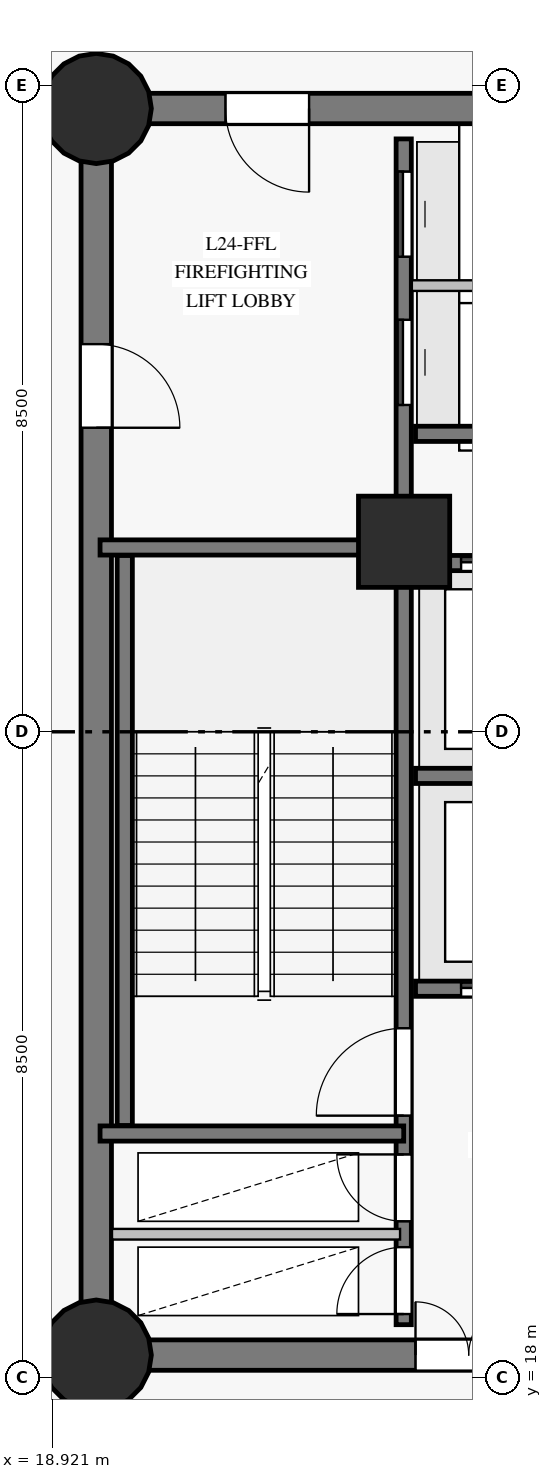
"""IFC4 building model, lengths in metres.
Left out: names, types, materials, properties, quantities, classifications, styles, units other than length and angle.
Written with IfcOpenShell. Run it as: python <this file> out.ifc"""

import sys

from ifc_helpers import new_model, si_unit, direction, frame, frame_2d, origin, origin_with_axes, origin_2d, place, context, subcontext, project, spatial, rectangle, circle, extrude, source, transform, mapped, element, fill, save


model = new_model("IFC4")
c1 = context("Model", 3, precision=1e-05, world=origin(), true_north=direction((0.0, 1.0)))
c2 = subcontext(c1, "Body", "Model", "MODEL_VIEW")
j1 = project(units=[si_unit("LENGTHUNIT", "METRE"), si_unit("PLANEANGLEUNIT", "RADIAN")], contexts=[c1])
p1 = place(None, origin())
s1 = spatial("IfcSite", under=j1, at=p1, CompositionType="ELEMENT")
p2 = place(p1, origin())
s2 = spatial("IfcBuilding", under=s1, at=p2, CompositionType="ELEMENT")
p3 = place(p2, frame((0.0, 0.0, 92.2)))
s3 = spatial("IfcBuildingStorey", under=s2, at=p3, CompositionType="ELEMENT", Elevation=92.2)
p4 = place(p3, frame((19.5, 18.3, 0.0), z_axis=(0.0, 0.0, 1.0), x_axis=(1.0, 0.0, 0.0)))
e1 = element("IfcWall", 1, at=p4, inside=s3, PredefinedType="SHEAR", context=c2, shape_type="SweptSolid", body=[
    extrude(rectangle(XDim=7.05, YDim=0.4, at=frame_2d((3.525, 0.0))), origin(), (0.0, 0.0, 1.0), 3.775),
])
p5 = place(p4, frame((4.2, 0.0, 0.0)))
e2 = element("IfcOpeningElement", 2, at=p5, cuts=e1, PredefinedType="OPENING", context=c2, shape_type="SweptSolid", body=[
    extrude(rectangle(XDim=1.4, YDim=2.2, at=frame_2d((0.7, 1.1))), frame((0.0, 0.21, 0.0), z_axis=(0.0, -1.0, 0.0), x_axis=(1.0, 0.0, 0.0)), (0.0, 0.0, 1.0), 0.42),
])
p6 = place(p3, frame((26.55, 34.7, 0.0), z_axis=(0.0, 0.0, 1.0), x_axis=(-1.0, 0.0, 0.0)))
e3 = element("IfcWall", 3, at=p6, inside=s3, PredefinedType="SHEAR", context=c2, shape_type="SweptSolid", body=[
    extrude(rectangle(XDim=7.05, YDim=0.4, at=frame_2d((3.525, 0.0))), origin(), (0.0, 0.0, 1.0), 3.775),
])
p7 = place(p6, frame((4.25, 0.0, 0.0)))
e4 = element("IfcOpeningElement", 4, at=p7, cuts=e3, PredefinedType="OPENING", context=c2, shape_type="SweptSolid", body=[
    extrude(rectangle(XDim=1.1, YDim=2.15, at=frame_2d((0.55, 1.075))), frame((0.0, 0.21, 0.0), z_axis=(0.0, -1.0, 0.0), x_axis=(1.0, 0.0, 0.0)), (0.0, 0.0, 1.0), 0.42),
])
p8 = place(p3, frame((19.5, 34.7, 0.0), z_axis=(0.0, 0.0, 1.0), x_axis=(0.0, -1.0, 0.0)))
e5 = element("IfcWall", 5, at=p8, inside=s3, PredefinedType="SHEAR", context=c2, shape_type="SweptSolid", body=[
    extrude(rectangle(XDim=16.4, YDim=0.4, at=frame_2d((8.2, 0.0))), origin(), (0.0, 0.0, 1.0), 3.775),
])
p9 = place(p8, frame((3.1, 0.0, 0.0)))
e6 = element("IfcOpeningElement", 6, at=p9, cuts=e5, PredefinedType="OPENING", context=c2, shape_type="SweptSolid", body=[
    extrude(rectangle(XDim=1.1, YDim=2.15, at=frame_2d((0.55, 1.075))), frame((0.0, 0.21, 0.0), z_axis=(0.0, -1.0, 0.0), x_axis=(1.0, 0.0, 0.0)), (0.0, 0.0, 1.0), 0.42),
])
m1 = source(origin_with_axes(), c2, "Body", "SweptSolid", [
    extrude(circle(Radius=0.725, at=origin_2d()), origin(), (0.0, 0.0, 1.0), 4.0),
])
for number, where, z_axis, x_axis in (
    (7, (19.5, 18.3, 0.0), (0.0, 0.0, 1.0), (1.0, 0.0, 0.0)),
    (8, (19.5, 34.7, 0.0), (0.0, 0.0, 1.0), (1.0, 0.0, 0.0)),
):
    element("IfcColumn", number, at=place(p3, frame(where, z_axis=z_axis, x_axis=x_axis)), inside=s3, PredefinedType="COLUMN", context=c2, shape_type="MappedRepresentation", body=[
        mapped(m1, transform((0.0, 0.0, 0.0), scale=1.0)),
    ])
m2 = source(origin_with_axes(), c2, "Body", "SweptSolid", [
    extrude(rectangle(XDim=1.2, YDim=1.2, at=origin_2d()), origin(), (0.0, 0.0, 1.0), 4.0),
])
p10 = place(p3, frame((23.55, 29.0, 0.0), z_axis=(0.0, 0.0, 1.0), x_axis=(1.0, 0.0, 0.0)))
e9 = element("IfcColumn", 9, at=p10, inside=s3, PredefinedType="COLUMN", context=c2, shape_type="MappedRepresentation", body=[
    mapped(m2, transform((0.0, 0.0, 0.0), scale=1.0)),
])
p11 = place(p3, frame((22.111, 46.894, 0.0), z_axis=(0.0, 0.0, 1.0), x_axis=(-0.621146049856, -0.783694828839, 0.0)))
e10 = element("IfcWall", 10, at=p11, inside=s3, PredefinedType="SOLIDWALL", context=c2, shape_type="SweptSolid", body=[
    extrude(rectangle(XDim=24.028, YDim=0.32, at=frame_2d((12.014, 0.0))), origin(), (0.0, 0.0, 1.0), 3.445),
])
p12 = place(p11, frame((5.801, 0.0, 0.85)))
e11 = element("IfcOpeningElement", 11, at=p12, cuts=e10, PredefinedType="OPENING", context=c2, shape_type="SweptSolid", body=[
    extrude(rectangle(XDim=1.65, YDim=1.65, at=frame_2d((0.825, 0.825))), frame((0.0, 0.17, 0.0), z_axis=(0.0, -1.0, 0.0), x_axis=(1.0, 0.0, 0.0)), (0.0, 0.0, 1.0), 0.34),
])
p13 = place(p11, frame((15.706, 0.0, 0.85)))
e12 = element("IfcOpeningElement", 12, at=p13, cuts=e10, PredefinedType="OPENING", context=c2, shape_type="SweptSolid", body=[
    extrude(rectangle(XDim=1.65, YDim=1.65, at=frame_2d((0.825, 0.825))), frame((0.0, 0.17, 0.0), z_axis=(0.0, -1.0, 0.0), x_axis=(1.0, 0.0, 0.0)), (0.0, 0.0, 1.0), 0.34),
])
p14 = place(p11, frame((20.5, 0.0, 0.0)))
e13 = element("IfcOpeningElement", 13, at=p14, cuts=e10, PredefinedType="OPENING", context=c2, shape_type="SweptSolid", body=[
    extrude(rectangle(XDim=1.05, YDim=2.12, at=frame_2d((0.525, 1.06))), frame((0.0, 0.17, 0.0), z_axis=(0.0, -1.0, 0.0), x_axis=(1.0, 0.0, 0.0)), (0.0, 0.0, 1.0), 0.34),
])
p15 = place(p3, frame((23.545, 18.7, 0.0), z_axis=(0.0, 0.0, 1.0), x_axis=(0.0, 1.0, 0.0)))
e14 = element("IfcWall", 14, at=p15, inside=s3, PredefinedType="SHEAR", context=c2, shape_type="SweptSolid", body=[
    extrude(rectangle(XDim=15.6, YDim=0.2, at=frame_2d((7.8, 0.0))), origin(), (0.0, 0.0, 1.0), 3.775),
])
p16 = place(p15, frame((2.75, 0.0, 0.0)))
e15 = element("IfcOpeningElement", 15, at=p16, cuts=e14, PredefinedType="OPENING", context=c2, shape_type="SweptSolid", body=[
    extrude(rectangle(XDim=1.15, YDim=2.15, at=frame_2d((0.575, 1.075))), frame((0.0, 0.11, 0.0), z_axis=(0.0, -1.0, 0.0), x_axis=(1.0, 0.0, 0.0)), (0.0, 0.0, 1.0), 0.22),
])
p17 = place(p15, frame((0.14, 0.0, 0.0)))
e16 = element("IfcOpeningElement", 16, at=p17, cuts=e14, PredefinedType="OPENING", context=c2, shape_type="SweptSolid", body=[
    extrude(rectangle(XDim=0.88, YDim=2.1, at=frame_2d((0.44, 1.05))), frame((0.0, 0.11, 0.0), z_axis=(0.0, -1.0, 0.0), x_axis=(1.0, 0.0, 0.0)), (0.0, 0.0, 1.0), 0.22),
])
p18 = place(p15, frame((1.36, 0.0, 0.0)))
e17 = element("IfcOpeningElement", 17, at=p18, cuts=e14, PredefinedType="OPENING", context=c2, shape_type="SweptSolid", body=[
    extrude(rectangle(XDim=0.88, YDim=2.1, at=frame_2d((0.44, 1.05))), frame((0.0, 0.11, 0.0), z_axis=(0.0, -1.0, 0.0), x_axis=(1.0, 0.0, 0.0)), (0.0, 0.0, 1.0), 0.22),
])
p19 = place(p15, frame((12.1, 0.0, 0.0)))
e18 = element("IfcOpeningElement", 18, at=p19, cuts=e14, PredefinedType="OPENING", context=c2, shape_type="SweptSolid", body=[
    extrude(rectangle(XDim=1.12, YDim=2.15, at=frame_2d((0.56, 1.075))), frame((0.0, 0.11, 0.0), z_axis=(0.0, -1.0, 0.0), x_axis=(1.0, 0.0, 0.0)), (0.0, 0.0, 1.0), 0.22),
])
p20 = place(p15, frame((14.05, 0.0, 0.0)))
e19 = element("IfcOpeningElement", 19, at=p20, cuts=e14, PredefinedType="OPENING", context=c2, shape_type="SweptSolid", body=[
    extrude(rectangle(XDim=1.12, YDim=2.15, at=frame_2d((0.56, 1.075))), frame((0.0, 0.11, 0.0), z_axis=(0.0, -1.0, 0.0), x_axis=(1.0, 0.0, 0.0)), (0.0, 0.0, 1.0), 0.22),
])
p21 = place(p3, frame((23.7, 23.12, 0.0), z_axis=(0.0, 0.0, 1.0), x_axis=(1.0, 0.0, 0.0)))
e20 = element("IfcWall", 20, at=p21, inside=s3, PredefinedType="SHEAR", context=c2, shape_type="SweptSolid", body=[
    extrude(rectangle(XDim=9.6, YDim=0.2, at=frame_2d((4.8, 0.0))), origin(), (0.0, 0.0, 1.0), 3.775),
])
p22 = place(p21, frame((0.6, 0.0, 0.0)))
e21 = element("IfcOpeningElement", 21, at=p22, cuts=e20, PredefinedType="OPENING", context=c2, shape_type="SweptSolid", body=[
    extrude(rectangle(XDim=1.1, YDim=2.15, at=frame_2d((0.55, 1.075))), frame((0.0, 0.11, 0.0), z_axis=(0.0, -1.0, 0.0), x_axis=(1.0, 0.0, 0.0)), (0.0, 0.0, 1.0), 0.22),
])
p23 = place(p21, frame((2.98, 0.0, 0.0)))
e22 = element("IfcOpeningElement", 22, at=p23, cuts=e20, PredefinedType="OPENING", context=c2, shape_type="SweptSolid", body=[
    extrude(rectangle(XDim=1.1, YDim=2.15, at=frame_2d((0.55, 1.075))), frame((0.0, 0.11, 0.0), z_axis=(0.0, -1.0, 0.0), x_axis=(1.0, 0.0, 0.0)), (0.0, 0.0, 1.0), 0.22),
])
p24 = place(p21, frame((5.36, 0.0, 0.0)))
e23 = element("IfcOpeningElement", 23, at=p24, cuts=e20, PredefinedType="OPENING", context=c2, shape_type="SweptSolid", body=[
    extrude(rectangle(XDim=1.1, YDim=2.15, at=frame_2d((0.55, 1.075))), frame((0.0, 0.11, 0.0), z_axis=(0.0, -1.0, 0.0), x_axis=(1.0, 0.0, 0.0)), (0.0, 0.0, 1.0), 0.22),
])
p25 = place(p21, frame((7.74, 0.0, 0.0)))
e24 = element("IfcOpeningElement", 24, at=p25, cuts=e20, PredefinedType="OPENING", context=c2, shape_type="SweptSolid", body=[
    extrude(rectangle(XDim=1.1, YDim=2.15, at=frame_2d((0.55, 1.075))), frame((0.0, 0.11, 0.0), z_axis=(0.0, -1.0, 0.0), x_axis=(1.0, 0.0, 0.0)), (0.0, 0.0, 1.0), 0.22),
])
p26 = place(p3, frame((23.7, 25.92, 0.0), z_axis=(0.0, 0.0, 1.0), x_axis=(1.0, 0.0, 0.0)))
e25 = element("IfcWall", 25, at=p26, inside=s3, PredefinedType="SHEAR", context=c2, shape_type="SweptSolid", body=[
    extrude(rectangle(XDim=9.6, YDim=0.2, at=frame_2d((4.8, 0.0))), origin(), (0.0, 0.0, 1.0), 3.775),
])
p27 = place(p3, frame((23.7, 28.72, 0.0), z_axis=(0.0, 0.0, 1.0), x_axis=(1.0, 0.0, 0.0)))
e26 = element("IfcWall", 26, at=p27, inside=s3, PredefinedType="SHEAR", context=c2, shape_type="SweptSolid", body=[
    extrude(rectangle(XDim=9.6, YDim=0.2, at=frame_2d((4.8, 0.0))), origin(), (0.0, 0.0, 1.0), 3.775),
])
p28 = place(p27, frame((0.6, 0.0, 0.0)))
e27 = element("IfcOpeningElement", 27, at=p28, cuts=e26, PredefinedType="OPENING", context=c2, shape_type="SweptSolid", body=[
    extrude(rectangle(XDim=1.1, YDim=2.15, at=frame_2d((0.55, 1.075))), frame((0.0, 0.11, 0.0), z_axis=(0.0, -1.0, 0.0), x_axis=(1.0, 0.0, 0.0)), (0.0, 0.0, 1.0), 0.22),
])
p29 = place(p27, frame((2.98, 0.0, 0.0)))
e28 = element("IfcOpeningElement", 28, at=p29, cuts=e26, PredefinedType="OPENING", context=c2, shape_type="SweptSolid", body=[
    extrude(rectangle(XDim=1.1, YDim=2.15, at=frame_2d((0.55, 1.075))), frame((0.0, 0.11, 0.0), z_axis=(0.0, -1.0, 0.0), x_axis=(1.0, 0.0, 0.0)), (0.0, 0.0, 1.0), 0.22),
])
p30 = place(p27, frame((5.36, 0.0, 0.0)))
e29 = element("IfcOpeningElement", 29, at=p30, cuts=e26, PredefinedType="OPENING", context=c2, shape_type="SweptSolid", body=[
    extrude(rectangle(XDim=1.1, YDim=2.15, at=frame_2d((0.55, 1.075))), frame((0.0, 0.11, 0.0), z_axis=(0.0, -1.0, 0.0), x_axis=(1.0, 0.0, 0.0)), (0.0, 0.0, 1.0), 0.22),
])
p31 = place(p27, frame((7.74, 0.0, 0.0)))
e30 = element("IfcOpeningElement", 30, at=p31, cuts=e26, PredefinedType="OPENING", context=c2, shape_type="SweptSolid", body=[
    extrude(rectangle(XDim=1.1, YDim=2.15, at=frame_2d((0.55, 1.075))), frame((0.0, 0.11, 0.0), z_axis=(0.0, -1.0, 0.0), x_axis=(1.0, 0.0, 0.0)), (0.0, 0.0, 1.0), 0.22),
])
p32 = place(p3, frame((19.875, 21.32, 0.0), z_axis=(0.0, 0.0, 1.0), x_axis=(0.0, 1.0, 0.0)))
e31 = element("IfcWall", 31, at=p32, inside=s3, PredefinedType="SHEAR", context=c2, shape_type="SweptSolid", body=[
    extrude(rectangle(XDim=7.5, YDim=0.2, at=frame_2d((3.75, 0.0))), origin(), (0.0, 0.0, 1.0), 3.775),
])
for number, where, z_axis, x_axis in (
    (32, (19.55, 21.215, 0.0), (0.0, 0.0, 1.0), (1.0, 0.0, 0.0)),
    (33, (19.55, 28.925, 0.0), (0.0, 0.0, 1.0), (1.0, 0.0, 0.0)),
):
    element("IfcWall", number, at=place(p3, frame(where, z_axis=z_axis, x_axis=x_axis)), inside=s3, PredefinedType="SHEAR", context=c2, shape_type="SweptSolid", body=[
        extrude(rectangle(XDim=3.995, YDim=0.2, at=frame_2d((1.998, 0.0))), origin(), (0.0, 0.0, 1.0), 3.775),
    ])
p33 = place(p3, frame((23.7, 30.42, 0.0), z_axis=(0.0, 0.0, 1.0), x_axis=(1.0, 0.0, 0.0)))
e34 = element("IfcWall", 34, at=p33, inside=s3, PredefinedType="SHEAR", context=c2, shape_type="SweptSolid", body=[
    extrude(rectangle(XDim=2.78, YDim=0.2, at=frame_2d((1.39, 0.0))), origin(), (0.0, 0.0, 1.0), 3.775),
])
p34 = place(p3, frame((19.707, 19.89, 0.0), z_axis=(0.0, 0.0, 1.0), x_axis=(1.0, 0.0, 0.0)))
e35 = element("IfcWall", 35, at=p34, inside=s3, PredefinedType="PARTITIONING", context=c2, shape_type="SweptSolid", body=[
    extrude(rectangle(XDim=3.79, YDim=0.14, at=frame_2d((1.895, 0.0))), origin(), (0.0, 0.0, 1.0), 3.775),
])
p35 = place(p3, frame((23.652, 32.37, 0.0), z_axis=(0.0, 0.0, 1.0), x_axis=(1.0, 0.0, 0.0)))
e36 = element("IfcWall", 36, at=p35, inside=s3, PredefinedType="PARTITIONING", context=c2, shape_type="SweptSolid", body=[
    extrude(rectangle(XDim=2.828, YDim=0.14, at=frame_2d((1.414, 0.0))), origin(), (0.0, 0.0, 1.0), 3.775),
])
m3 = source(origin_with_axes(), c2, "Body", "SweptSolid", [
    extrude(rectangle(XDim=1.15, YDim=2.15, at=frame_2d((0.575, 1.075))), frame((0.0, 0.025, 0.0), z_axis=(0.0, -1.0, 0.0), x_axis=(1.0, 0.0, 0.0)), (0.0, 0.0, 1.0), 0.05),
])
p36 = place(p16, origin())
e37 = element("IfcDoor", 37, at=p36, inside=s3, OperationType="SINGLE_SWING_LEFT", PredefinedType="DOOR", context=c2, shape_type="MappedRepresentation", body=[
    mapped(m3, transform((0.0, 0.0, 0.0), scale=1.0)),
])
fill(e15, e37)
m4 = source(origin_with_axes(), c2, "Body", "SweptSolid", [
    extrude(rectangle(XDim=1.1, YDim=2.15, at=frame_2d((0.55, 1.075))), frame((0.0, 0.025, 0.0), z_axis=(0.0, -1.0, 0.0), x_axis=(1.0, 0.0, 0.0)), (0.0, 0.0, 1.0), 0.05),
])
p37 = place(p7, origin())
e38 = element("IfcDoor", 38, at=p37, inside=s3, OperationType="SINGLE_SWING_LEFT", PredefinedType="DOOR", context=c2, shape_type="MappedRepresentation", body=[
    mapped(m4, transform((0.0, 0.0, 0.0), scale=1.0)),
])
fill(e4, e38)
p38 = place(p9, origin())
e39 = element("IfcDoor", 39, at=p38, inside=s3, OperationType="SINGLE_SWING_RIGHT", PredefinedType="DOOR", context=c2, shape_type="MappedRepresentation", body=[
    mapped(m4, transform((0.0, 0.0, 0.0), scale=1.0)),
])
fill(e6, e39)
m5 = source(origin_with_axes(), c2, "Body", "SweptSolid", [
    extrude(rectangle(XDim=0.88, YDim=2.1, at=frame_2d((0.44, 1.05))), frame((0.0, 0.025, 0.0), z_axis=(0.0, -1.0, 0.0), x_axis=(1.0, 0.0, 0.0)), (0.0, 0.0, 1.0), 0.05),
])
p39 = place(p17, origin())
e40 = element("IfcDoor", 40, at=p39, inside=s3, OperationType="SINGLE_SWING_LEFT", PredefinedType="DOOR", context=c2, shape_type="MappedRepresentation", body=[
    mapped(m5, transform((0.0, 0.0, 0.0), scale=1.0)),
])
fill(e16, e40)
p40 = place(p18, origin())
e41 = element("IfcDoor", 41, at=p40, inside=s3, OperationType="SINGLE_SWING_RIGHT", PredefinedType="DOOR", context=c2, shape_type="MappedRepresentation", body=[
    mapped(m5, transform((0.0, 0.0, 0.0), scale=1.0)),
])
fill(e17, e41)
m6 = source(origin_with_axes(), c2, "Body", "SweptSolid", [
    extrude(rectangle(XDim=1.4, YDim=2.2, at=frame_2d((0.7, 1.1))), frame((0.0, 0.025, 0.0), z_axis=(0.0, -1.0, 0.0), x_axis=(1.0, 0.0, 0.0)), (0.0, 0.0, 1.0), 0.05),
])
p41 = place(p5, origin())
e42 = element("IfcDoor", 42, at=p41, inside=s3, OperationType="DOUBLE_DOOR_SINGLE_SWING", PredefinedType="DOOR", context=c2, shape_type="MappedRepresentation", body=[
    mapped(m6, transform((0.0, 0.0, 0.0), scale=1.0)),
])
fill(e2, e42)
p42 = place(p22, origin())
e43 = element("IfcDoor", 43, at=p42, inside=s3, OperationType="SLIDING_TO_LEFT", PredefinedType="DOOR", context=c2, shape_type="MappedRepresentation", body=[
    mapped(m4, transform((0.0, 0.0, 0.0), scale=1.0)),
])
fill(e21, e43)
p43 = place(p28, origin())
e44 = element("IfcDoor", 44, at=p43, inside=s3, OperationType="SLIDING_TO_LEFT", PredefinedType="DOOR", context=c2, shape_type="MappedRepresentation", body=[
    mapped(m4, transform((0.0, 0.0, 0.0), scale=1.0)),
])
fill(e27, e44)
m7 = source(origin_with_axes(), c2, "Body", "SweptSolid", [
    extrude(rectangle(XDim=1.12, YDim=2.15, at=frame_2d((0.56, 1.075))), frame((0.0, 0.025, 0.0), z_axis=(0.0, -1.0, 0.0), x_axis=(1.0, 0.0, 0.0)), (0.0, 0.0, 1.0), 0.05),
])
p44 = place(p19, origin())
e45 = element("IfcDoor", 45, at=p44, inside=s3, OperationType="SLIDING_TO_LEFT", PredefinedType="DOOR", context=c2, shape_type="MappedRepresentation", body=[
    mapped(m7, transform((0.0, 0.0, 0.0), scale=1.0)),
])
fill(e18, e45)
p45 = place(p20, origin())
e46 = element("IfcDoor", 46, at=p45, inside=s3, OperationType="SLIDING_TO_RIGHT", PredefinedType="DOOR", context=c2, shape_type="MappedRepresentation", body=[
    mapped(m7, transform((0.0, 0.0, 0.0), scale=1.0)),
])
fill(e19, e46)
save(model, sys.argv[1])
